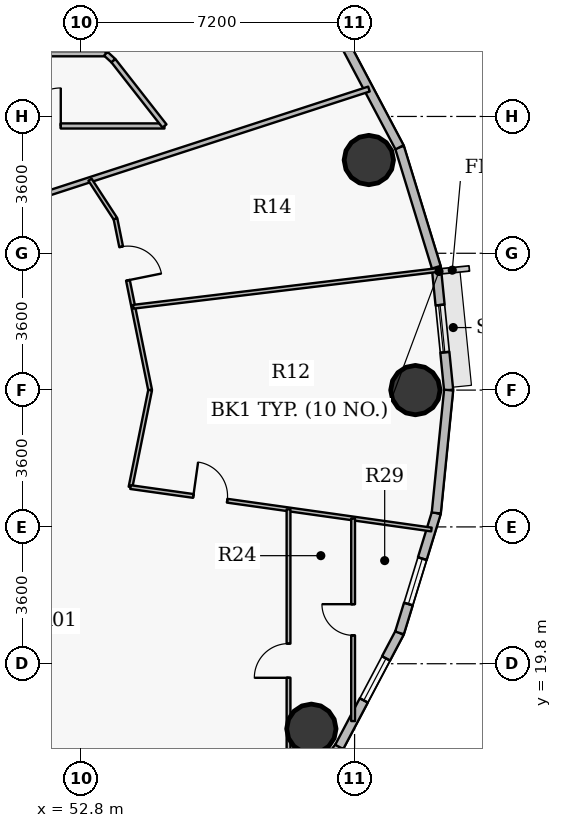
"""IFC4 building model, lengths in metres.
Left out: names, types, materials, properties, quantities, classifications, styles, units other than length and angle.
Written with IfcOpenShell. Run it as: python <this file> out.ifc"""

import sys

from ifc_helpers import new_model, si_unit, direction, frame, frame_2d, origin, origin_2d, place, context, subcontext, project, spatial, rectangle, hollow_circle, extrude, source, transform, mapped, element, fill, save


model = new_model("IFC4")
c1 = context("Model", 3, precision=1e-05, world=origin(), true_north=direction((0.0, 1.0)))
c2 = subcontext(c1, "Body", "Model", "MODEL_VIEW")
j1 = project(units=[si_unit("LENGTHUNIT", "METRE"), si_unit("PLANEANGLEUNIT", "RADIAN")], contexts=[c1])
p1 = place(None, origin())
s1 = spatial("IfcSite", under=j1, at=p1, CompositionType="ELEMENT")
p2 = place(p1, origin())
s2 = spatial("IfcBuilding", under=s1, at=p2, CompositionType="ELEMENT")
p3 = place(p2, frame((0.0, 0.0, 159.9)))
s3 = spatial("IfcBuildingStorey", under=s2, at=p3, CompositionType="ELEMENT", Elevation=159.9)
for number, where, z_axis, x_axis in (
    (1, (61.6, 27.0, 0.0), (0.0, 0.0, 1.0), (1.0, 0.0, 0.0)),
    (2, (60.375, 33.053, 0.0), (0.0, 0.0, 1.0), (1.0, 0.0, 0.0)),
    (3, (58.863, 18.089, 0.0), (0.0, 0.0, 1.0), (1.0, 0.0, 0.0)),
):
    element("IfcColumn", number, at=place(p3, frame(where, z_axis=z_axis, x_axis=x_axis)), inside=s3, PredefinedType="COLUMN", context=c2, shape_type="SweptSolid", body=[
        extrude(hollow_circle(Radius=0.65, WallThickness=0.04, at=origin_2d()), origin(), (0.0, 0.0, 1.0), 3.75),
    ])
p4 = place(p3, frame((62.15, 30.234, 0.0), z_axis=(0.0, 0.0, 1.0), x_axis=(0.100061534614, -0.994981250723, 0.0)))
e4 = element("IfcWall", 4, at=p4, inside=s3, PredefinedType="SOLIDWALL", context=c2, shape_type="SweptSolid", body=[
    extrude(rectangle(XDim=3.25, YDim=0.24, at=frame_2d((1.625, 0.0))), origin(), (0.0, 0.0, 1.0), 3.5),
])
p5 = place(p4, frame((1.0, 0.0, 0.9)))
e5 = element("IfcOpeningElement", 5, at=p5, cuts=e4, PredefinedType="OPENING", context=c2, shape_type="SweptSolid", body=[
    extrude(rectangle(XDim=1.25, YDim=1.65, at=origin_2d()), frame((0.625, 0.13, 0.825), z_axis=(0.0, -1.0, 0.0), x_axis=(1.0, 0.0, 0.0)), (0.0, 0.0, 1.0), 0.26),
])
p6 = place(p3, frame((61.183, 33.389, 0.0), z_axis=(0.0, 0.0, 1.0), x_axis=(0.293097995113, -0.956082405058, 0.0)))
e6 = element("IfcWall", 6, at=p6, inside=s3, PredefinedType="SOLIDWALL", context=c2, shape_type="SweptSolid", body=[
    extrude(rectangle(XDim=3.3, YDim=0.24, at=frame_2d((1.65, 0.0))), origin(), (0.0, 0.0, 1.0), 3.5),
])
p7 = place(p3, frame((59.596, 36.388, 0.0), z_axis=(0.0, 0.0, 1.0), x_axis=(0.467586874938, -0.88394712194, 0.0)))
e7 = element("IfcWall", 7, at=p7, inside=s3, PredefinedType="SOLIDWALL", context=c2, shape_type="SweptSolid", body=[
    extrude(rectangle(XDim=3.393, YDim=0.24, at=frame_2d((1.697, 0.0))), origin(), (0.0, 0.0, 1.0), 3.5),
])
p8 = place(p3, frame((59.596, 17.612, 0.0), z_axis=(0.0, 0.0, 1.0), x_axis=(-0.616287674549, -0.787521112224, 0.0)))
e8 = element("IfcWall", 8, at=p8, inside=s3, PredefinedType="SOLIDWALL", context=c2, shape_type="SweptSolid", body=[
    extrude(rectangle(XDim=3.517, YDim=0.24, at=frame_2d((1.759, 0.0))), origin(), (0.0, 0.0, 1.0), 3.5),
])
p9 = place(p3, frame((61.183, 20.611, 0.0), z_axis=(0.0, 0.0, 1.0), x_axis=(-0.467586874938, -0.88394712194, 0.0)))
e9 = element("IfcWall", 9, at=p9, inside=s3, PredefinedType="SOLIDWALL", context=c2, shape_type="SweptSolid", body=[
    extrude(rectangle(XDim=3.393, YDim=0.24, at=frame_2d((1.697, 0.0))), origin(), (0.0, 0.0, 1.0), 3.5),
])
p10 = place(p9, frame((0.759, 0.0, 0.9)))
e10 = element("IfcOpeningElement", 10, at=p10, cuts=e9, PredefinedType="OPENING", context=c2, shape_type="SweptSolid", body=[
    extrude(rectangle(XDim=1.25, YDim=1.65, at=origin_2d()), frame((0.625, 0.13, 0.825), z_axis=(0.0, -1.0, 0.0), x_axis=(1.0, 0.0, 0.0)), (0.0, 0.0, 1.0), 0.26),
])
p11 = place(p3, frame((62.15, 23.766, 0.0), z_axis=(0.0, 0.0, 1.0), x_axis=(-0.293097995113, -0.956082405058, 0.0)))
e11 = element("IfcWall", 11, at=p11, inside=s3, PredefinedType="SOLIDWALL", context=c2, shape_type="SweptSolid", body=[
    extrude(rectangle(XDim=3.3, YDim=0.24, at=frame_2d((1.65, 0.0))), origin(), (0.0, 0.0, 1.0), 3.5),
])
p12 = place(p11, frame((1.256, 0.0, 0.9)))
e12 = element("IfcOpeningElement", 12, at=p12, cuts=e11, PredefinedType="OPENING", context=c2, shape_type="SweptSolid", body=[
    extrude(rectangle(XDim=1.25, YDim=1.65, at=origin_2d()), frame((0.625, 0.13, 0.825), z_axis=(0.0, -1.0, 0.0), x_axis=(1.0, 0.0, 0.0)), (0.0, 0.0, 1.0), 0.26),
])
p13 = place(p3, frame((62.475, 27.0, 0.0), z_axis=(0.0, 0.0, 1.0), x_axis=(-0.100061534614, -0.994981250723, 0.0)))
e13 = element("IfcWall", 13, at=p13, inside=s3, PredefinedType="SOLIDWALL", context=c2, shape_type="SweptSolid", body=[
    extrude(rectangle(XDim=3.25, YDim=0.24, at=frame_2d((1.625, 0.0))), origin(), (0.0, 0.0, 1.0), 3.5),
])
p14 = place(p3, frame((24.35, 35.85, 0.0), z_axis=(0.0, 0.0, 1.0), x_axis=(1.0, 0.0, 0.0)))
e14 = element("IfcWall", 14, at=p14, inside=s3, PredefinedType="PARTITIONING", context=c2, shape_type="SweptSolid", body=[
    extrude(rectangle(XDim=29.104, YDim=0.135, at=frame_2d((14.552, 0.0))), origin(), (0.0, 0.0, 1.0), 2.935),
])
p15 = place(p14, frame((15.972, 0.0, 0.0)))
e15 = element("IfcOpeningElement", 15, at=p15, cuts=e14, PredefinedType="OPENING", context=c2, shape_type="SweptSolid", body=[
    extrude(rectangle(XDim=1.0, YDim=2.15, at=origin_2d()), frame((0.5, 0.078, 1.075), z_axis=(0.0, -1.0, 0.0), x_axis=(1.0, 0.0, 0.0)), (0.0, 0.0, 1.0), 0.155),
])
p16 = place(p14, frame((4.074, 0.0, 0.0)))
e16 = element("IfcOpeningElement", 16, at=p16, cuts=e14, PredefinedType="OPENING", context=c2, shape_type="SweptSolid", body=[
    extrude(rectangle(XDim=1.0, YDim=2.15, at=origin_2d()), frame((0.5, 0.078, 1.075), z_axis=(0.0, -1.0, 0.0), x_axis=(1.0, 0.0, 0.0)), (0.0, 0.0, 1.0), 0.155),
])
p17 = place(p3, frame((46.065, 33.95, 0.0), z_axis=(0.0, 0.0, 1.0), x_axis=(1.0, 0.0, 0.0)))
e17 = element("IfcWall", 17, at=p17, inside=s3, PredefinedType="PARTITIONING", context=c2, shape_type="SweptSolid", body=[
    extrude(rectangle(XDim=8.932, YDim=0.135, at=frame_2d((4.466, 0.0))), origin(), (0.0, 0.0, 1.0), 3.5),
])
p18 = place(p17, frame((5.204, 0.0, 0.0)))
e18 = element("IfcOpeningElement", 18, at=p18, cuts=e17, PredefinedType="OPENING", context=c2, shape_type="SweptSolid", body=[
    extrude(rectangle(XDim=1.0, YDim=2.15, at=origin_2d()), frame((0.5, 0.078, 1.075), z_axis=(0.0, -1.0, 0.0), x_axis=(1.0, 0.0, 0.0)), (0.0, 0.0, 1.0), 0.155),
])
p19 = place(p3, frame((46.71, 30.48, 0.0), z_axis=(0.0, 0.0, 1.0), x_axis=(0.951054665008, 0.309022691992, 0.0)))
e19 = element("IfcWall", 19, at=p19, inside=s3, PredefinedType="PARTITIONING", context=c2, shape_type="SweptSolid", body=[
    extrude(rectangle(XDim=14.372, YDim=0.135, at=frame_2d((7.186, 0.0))), origin(), (0.0, 0.0, 1.0), 2.935),
])
p20 = place(p3, frame((48.2, 18.756, 0.0), z_axis=(0.0, 0.0, 1.0), x_axis=(0.828559609568, -0.559900860325, 0.0)))
e20 = element("IfcWall", 20, at=p20, inside=s3, PredefinedType="PARTITIONING", context=c2, shape_type="SweptSolid", body=[
    extrude(rectangle(XDim=9.384, YDim=0.135, at=frame_2d((4.692, 0.0))), origin(), (0.0, 0.0, 1.0), 2.935),
])
p21 = place(p3, frame((53.038, 32.536, 0.0), z_axis=(0.0, 0.0, 1.0), x_axis=(0.545407162254, -0.83817123988, 0.0)))
e21 = element("IfcWall", 21, at=p21, inside=s3, PredefinedType="PARTITIONING", context=c2, shape_type="SweptSolid", body=[
    extrude(rectangle(XDim=1.229, YDim=0.1, at=frame_2d((0.615, 0.0))), origin(), (0.0, 0.0, 1.0), 2.935),
])
p22 = place(p3, frame((53.454, 35.85, 0.0), z_axis=(0.0, 0.0, 1.0), x_axis=(0.736667385572, -0.676255249913, 0.0)))
e22 = element("IfcWall", 22, at=p22, inside=s3, PredefinedType="PARTITIONING", context=c2, shape_type="SweptSolid", body=[
    extrude(rectangle(XDim=0.271, YDim=0.135, at=frame_2d((0.135, 0.0))), origin(), (0.0, 0.0, 1.0), 3.5),
])
p23 = place(p3, frame((53.653, 35.667, 0.0), z_axis=(0.0, 0.0, 1.0), x_axis=(0.616302223209, -0.787509726713, 0.0)))
e23 = element("IfcWall", 23, at=p23, inside=s3, PredefinedType="PARTITIONING", context=c2, shape_type="SweptSolid", body=[
    extrude(rectangle(XDim=2.18, YDim=0.135, at=frame_2d((1.09, 0.0))), origin(), (0.0, 0.0, 1.0), 3.5),
])
p24 = place(p3, frame((53.709, 31.506, 0.0), z_axis=(0.0, 0.0, 1.0), x_axis=(0.198209478932, -0.980159682124, 0.0)))
e24 = element("IfcWall", 24, at=p24, inside=s3, PredefinedType="PARTITIONING", context=c2, shape_type="SweptSolid", body=[
    extrude(rectangle(XDim=4.597, YDim=0.1, at=frame_2d((2.298, 0.0))), origin(), (0.0, 0.0, 1.0), 2.935),
])
p25 = place(p24, frame((0.75, 0.0, 0.0)))
e25 = element("IfcOpeningElement", 25, at=p25, cuts=e24, PredefinedType="OPENING", context=c2, shape_type="SweptSolid", body=[
    extrude(rectangle(XDim=0.9, YDim=2.1, at=origin_2d()), frame((0.45, 0.06, 1.05), z_axis=(0.0, -1.0, 0.0), x_axis=(1.0, 0.0, 0.0)), (0.0, 0.0, 1.0), 0.12),
])
p26 = place(p3, frame((54.104, 24.448, 0.0), z_axis=(0.0, 0.0, 1.0), x_axis=(0.198315541218, 0.980138228063, 0.0)))
e26 = element("IfcWall", 26, at=p26, inside=s3, PredefinedType="PARTITIONING", context=c2, shape_type="SweptSolid", body=[
    extrude(rectangle(XDim=2.604, YDim=0.1, at=frame_2d((1.302, 0.0))), origin(), (0.0, 0.0, 1.0), 2.935),
])
p27 = place(p3, frame((54.104, 24.448, 0.0), z_axis=(0.0, 0.0, 1.0), x_axis=(0.990209750791, -0.139587425789, 0.0)))
e27 = element("IfcWall", 27, at=p27, inside=s3, PredefinedType="PARTITIONING", context=c2, shape_type="SweptSolid", body=[
    extrude(rectangle(XDim=7.997, YDim=0.1, at=frame_2d((3.998, 0.0))), origin(), (0.0, 0.0, 1.0), 2.935),
])
p28 = place(p27, frame((1.67, 0.0, 0.0)))
e28 = element("IfcOpeningElement", 28, at=p28, cuts=e27, PredefinedType="OPENING", context=c2, shape_type="SweptSolid", body=[
    extrude(rectangle(XDim=0.9, YDim=2.1, at=origin_2d()), frame((0.45, 0.06, 1.05), z_axis=(0.0, -1.0, 0.0), x_axis=(1.0, 0.0, 0.0)), (0.0, 0.0, 1.0), 0.12),
])
p29 = place(p3, frame((54.177, 29.193, 0.0), z_axis=(0.0, 0.0, 1.0), x_axis=(0.992799222866, 0.119790246168, 0.0)))
e29 = element("IfcWall", 29, at=p29, inside=s3, PredefinedType="PARTITIONING", context=c2, shape_type="SweptSolid", body=[
    extrude(rectangle(XDim=8.044, YDim=0.1, at=frame_2d((4.022, 0.0))), origin(), (0.0, 0.0, 1.0), 2.935),
])
p30 = place(p3, frame((58.262, 15.899, 0.0), z_axis=(0.0, 0.0, 1.0), x_axis=(0.0, 1.0, 0.0)))
e30 = element("IfcWall", 30, at=p30, inside=s3, PredefinedType="PARTITIONING", context=c2, shape_type="SweptSolid", body=[
    extrude(rectangle(XDim=7.963, YDim=0.1, at=frame_2d((3.981, 0.0))), origin(), (0.0, 0.0, 1.0), 2.935),
])
p31 = place(p30, frame((3.531, 0.0, 0.0)))
e31 = element("IfcOpeningElement", 31, at=p31, cuts=e30, PredefinedType="OPENING", context=c2, shape_type="SweptSolid", body=[
    extrude(rectangle(XDim=0.9, YDim=2.1, at=origin_2d()), frame((0.45, 0.06, 1.05), z_axis=(0.0, -1.0, 0.0), x_axis=(1.0, 0.0, 0.0)), (0.0, 0.0, 1.0), 0.12),
])
p32 = place(p3, frame((59.961, 18.291, 0.0), z_axis=(0.0, 0.0, 1.0), x_axis=(0.0, 1.0, 0.0)))
e32 = element("IfcWall", 32, at=p32, inside=s3, PredefinedType="PARTITIONING", context=c2, shape_type="SweptSolid", body=[
    extrude(rectangle(XDim=5.331, YDim=0.1, at=frame_2d((2.666, 0.0))), origin(), (0.0, 0.0, 1.0), 2.935),
])
p33 = place(p32, frame((2.256, 0.0, 0.0)))
e33 = element("IfcOpeningElement", 33, at=p33, cuts=e32, PredefinedType="OPENING", context=c2, shape_type="SweptSolid", body=[
    extrude(rectangle(XDim=0.82, YDim=2.1, at=origin_2d()), frame((0.41, 0.06, 1.05), z_axis=(0.0, -1.0, 0.0), x_axis=(1.0, 0.0, 0.0)), (0.0, 0.0, 1.0), 0.12),
])
m1 = source(origin(), c2, "Body", "SweptSolid", [
    extrude(rectangle(XDim=1.25, YDim=1.65, at=origin_2d()), frame((0.625, 0.03, 0.825), z_axis=(0.0, -1.0, 0.0), x_axis=(1.0, 0.0, 0.0)), (0.0, 0.0, 1.0), 0.06),
])
p34 = place(p10, origin())
e34 = element("IfcWindow", 34, at=p34, inside=s3, PartitioningType="SINGLE_PANEL", PredefinedType="WINDOW", context=c2, shape_type="MappedRepresentation", body=[
    mapped(m1, transform((0.0, 0.0, 0.0), x_axis=(1.0, 0.0, 0.0), y_axis=(0.0, 1.0, 0.0), z_axis=(0.0, 0.0, 1.0), scale=1.0)),
])
fill(e10, e34)
p35 = place(p12, origin())
e35 = element("IfcWindow", 35, at=p35, inside=s3, PartitioningType="SINGLE_PANEL", PredefinedType="WINDOW", context=c2, shape_type="MappedRepresentation", body=[
    mapped(m1, transform((0.0, 0.0, 0.0), x_axis=(1.0, 0.0, 0.0), y_axis=(0.0, 1.0, 0.0), z_axis=(0.0, 0.0, 1.0), scale=1.0)),
])
fill(e12, e35)
p36 = place(p5, origin())
e36 = element("IfcWindow", 36, at=p36, inside=s3, PartitioningType="SINGLE_PANEL", PredefinedType="WINDOW", context=c2, shape_type="MappedRepresentation", body=[
    mapped(m1, transform((0.0, 0.0, 0.0), x_axis=(1.0, 0.0, 0.0), y_axis=(0.0, 1.0, 0.0), z_axis=(0.0, 0.0, 1.0), scale=1.0)),
])
fill(e5, e36)
m2 = source(origin(), c2, "Body", "SweptSolid", [
    extrude(rectangle(XDim=1.0, YDim=2.15, at=origin_2d()), frame((0.5, 0.025, 1.075), z_axis=(0.0, -1.0, 0.0), x_axis=(1.0, 0.0, 0.0)), (0.0, 0.0, 1.0), 0.05),
])
p37 = place(p18, origin())
e37 = element("IfcDoor", 37, at=p37, inside=s3, OperationType="SINGLE_SWING_RIGHT", PredefinedType="DOOR", context=c2, shape_type="MappedRepresentation", body=[
    mapped(m2, transform((0.0, 0.0, 0.0), x_axis=(1.0, 0.0, 0.0), y_axis=(0.0, 1.0, 0.0), z_axis=(0.0, 0.0, 1.0), scale=1.0)),
])
fill(e18, e37)
m3 = source(origin(), c2, "Body", "SweptSolid", [
    extrude(rectangle(XDim=0.9, YDim=2.1, at=origin_2d()), frame((0.45, 0.025, 1.05), z_axis=(0.0, -1.0, 0.0), x_axis=(1.0, 0.0, 0.0)), (0.0, 0.0, 1.0), 0.05),
])
p38 = place(p28, origin())
e38 = element("IfcDoor", 38, at=p38, inside=s3, OperationType="SINGLE_SWING_LEFT", PredefinedType="DOOR", context=c2, shape_type="MappedRepresentation", body=[
    mapped(m3, transform((0.0, 0.0, 0.0), x_axis=(1.0, 0.0, 0.0), y_axis=(0.0, 1.0, 0.0), z_axis=(0.0, 0.0, 1.0), scale=1.0)),
])
fill(e28, e38)
p39 = place(p25, origin())
e39 = element("IfcDoor", 39, at=p39, inside=s3, OperationType="SINGLE_SWING_RIGHT", PredefinedType="DOOR", context=c2, shape_type="MappedRepresentation", body=[
    mapped(m3, transform((0.0, 0.0, 0.0), x_axis=(1.0, 0.0, 0.0), y_axis=(0.0, 1.0, 0.0), z_axis=(0.0, 0.0, 1.0), scale=1.0)),
])
fill(e25, e39)
p40 = place(p31, origin())
e40 = element("IfcDoor", 40, at=p40, inside=s3, OperationType="SINGLE_SWING_LEFT", PredefinedType="DOOR", context=c2, shape_type="MappedRepresentation", body=[
    mapped(m3, transform((0.0, 0.0, 0.0), x_axis=(1.0, 0.0, 0.0), y_axis=(0.0, 1.0, 0.0), z_axis=(0.0, 0.0, 1.0), scale=1.0)),
])
fill(e31, e40)
m4 = source(origin(), c2, "Body", "SweptSolid", [
    extrude(rectangle(XDim=0.82, YDim=2.1, at=origin_2d()), frame((0.41, 0.025, 1.05), z_axis=(0.0, -1.0, 0.0), x_axis=(1.0, 0.0, 0.0)), (0.0, 0.0, 1.0), 0.05),
])
p41 = place(p33, origin())
e41 = element("IfcDoor", 41, at=p41, inside=s3, OperationType="SINGLE_SWING_RIGHT", PredefinedType="DOOR", context=c2, shape_type="MappedRepresentation", body=[
    mapped(m4, transform((0.0, 0.0, 0.0), x_axis=(1.0, 0.0, 0.0), y_axis=(0.0, 1.0, 0.0), z_axis=(0.0, 0.0, 1.0), scale=1.0)),
])
fill(e33, e41)
save(model, sys.argv[1])
